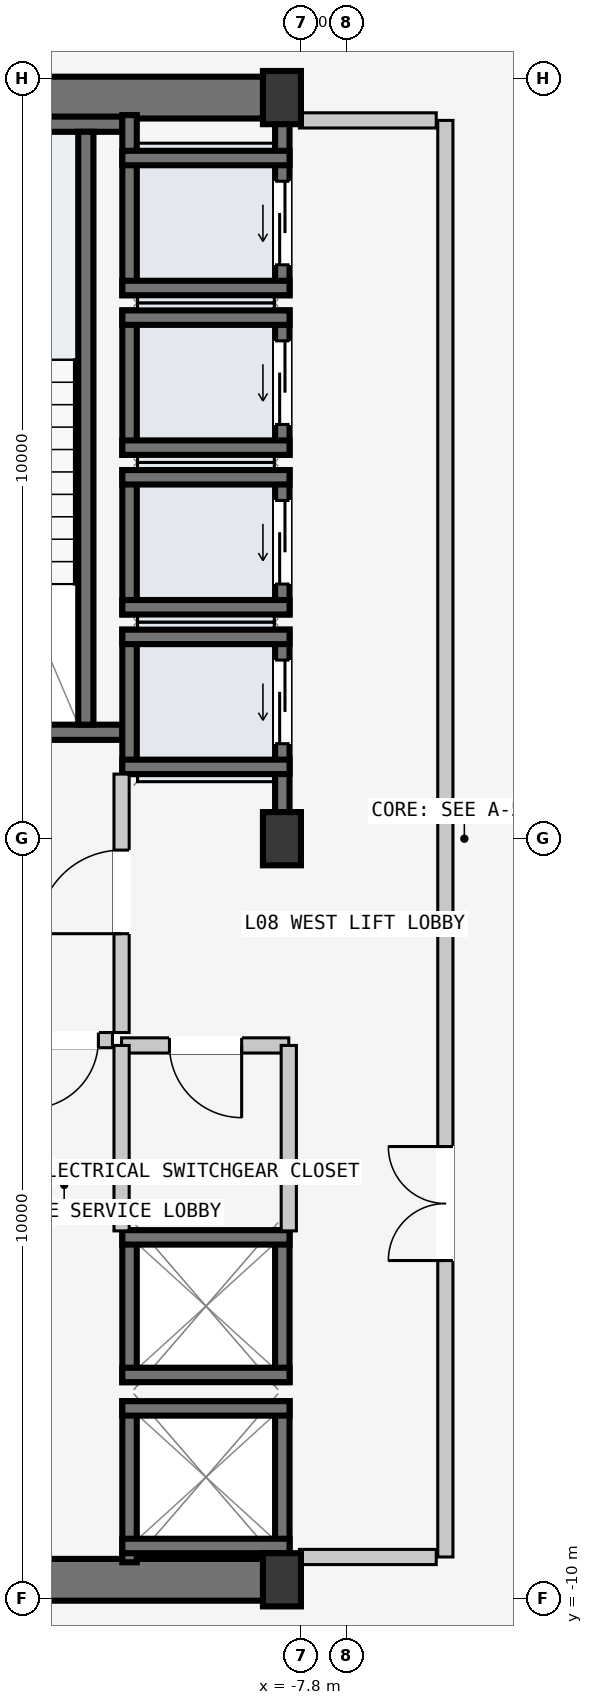
"""IFC4 building model, lengths in metres.
Left out: names, types, materials, properties, quantities, classifications, styles, units other than length and angle.
Written with IfcOpenShell. Run it as: python <this file> out.ifc"""

import sys

from ifc_helpers import new_model, si_unit, direction, frame, frame_2d, origin, origin_2d, place, context, subcontext, project, spatial, rectangle, i_section, extrude, element, fill, save


model = new_model("IFC4")
c1 = context("Model", 3, precision=1e-05, world=origin(), true_north=direction((0.0, 1.0)))
c2 = subcontext(c1, "Body", "Model", "MODEL_VIEW")
j1 = project(units=[si_unit("LENGTHUNIT", "METRE"), si_unit("PLANEANGLEUNIT", "RADIAN")], contexts=[c1])
p1 = place(None, origin())
s1 = spatial("IfcSite", under=j1, at=p1, CompositionType="ELEMENT")
p2 = place(p1, origin())
s2 = spatial("IfcBuilding", under=s1, at=p2, CompositionType="ELEMENT")
p3 = place(p2, frame((0.0, 0.0, 34.8)))
s3 = spatial("IfcBuildingStorey", under=s2, at=p3, CompositionType="ELEMENT", Elevation=34.8)
for number, where, z_axis, x_axis in (
    (1, (-14.53, -9.75, -0.2), (0.0, 0.0, 1.0), (1.0, 0.0, 0.0)),
    (2, (-14.53, 9.75, -0.2), (0.0, 0.0, 1.0), (1.0, 0.0, 0.0)),
):
    element("IfcWall", number, at=place(p3, frame(where, z_axis=z_axis, x_axis=x_axis)), inside=s3, PredefinedType="SHEAR", context=c2, shape_type="SweptSolid", body=[
        extrude(rectangle(XDim=6.46, YDim=0.55, at=frame_2d((3.23, 0.0))), origin(), (0.0, 0.0, 1.0), 3.6),
    ])
p4 = place(p3, frame((-14.25, 1.4, -0.2), z_axis=(0.0, 0.0, 1.0), x_axis=(1.0, 0.0, 0.0)))
e3 = element("IfcWall", 3, at=p4, inside=s3, PredefinedType="SOLIDWALL", context=c2, shape_type="SweptSolid", body=[
    extrude(rectangle(XDim=4.1, YDim=0.2, at=frame_2d((2.05, 0.0))), origin(), (0.0, 0.0, 1.0), 3.6),
])
p5 = place(p4, frame((1.5, 0.0, 0.2)))
e4 = element("IfcOpeningElement", 4, at=p5, cuts=e3, PredefinedType="OPENING", context=c2, shape_type="SweptSolid", body=[
    extrude(rectangle(XDim=1.12, YDim=2.18, at=frame_2d((0.56, 1.09))), frame((0.0, 0.11, 0.0), z_axis=(0.0, -1.0, 0.0), x_axis=(1.0, 0.0, 0.0)), (0.0, 0.0, 1.0), 0.22),
])
p6 = place(p3, frame((-14.25, 9.4, -0.2), z_axis=(0.0, 0.0, 1.0), x_axis=(1.0, 0.0, 0.0)))
e5 = element("IfcWall", 5, at=p6, inside=s3, PredefinedType="SOLIDWALL", context=c2, shape_type="SweptSolid", body=[
    extrude(rectangle(XDim=4.1, YDim=0.2, at=frame_2d((2.05, 0.0))), origin(), (0.0, 0.0, 1.0), 3.6),
])
p7 = place(p3, frame((-10.63, 1.5, -0.2), z_axis=(0.0, 0.0, 1.0), x_axis=(0.0, 1.0, 0.0)))
e6 = element("IfcWall", 6, at=p7, inside=s3, PredefinedType="SOLIDWALL", context=c2, shape_type="SweptSolid", body=[
    extrude(rectangle(XDim=7.8, YDim=0.2, at=frame_2d((3.9, 0.0))), origin(), (0.0, 0.0, 1.0), 3.6),
])
for number, where, z_axis, x_axis in (
    (7, (-8.05, -9.75, 0.0), (0.0, 0.0, 1.0), (1.0, 0.0, 0.0)),
    (8, (-8.05, 0.0, 0.0), (0.0, 0.0, 1.0), (1.0, 0.0, 0.0)),
    (9, (-8.05, 9.75, 0.0), (0.0, 0.0, 1.0), (1.0, 0.0, 0.0)),
):
    element("IfcColumn", number, at=place(p3, frame(where, z_axis=z_axis, x_axis=x_axis)), inside=s3, PredefinedType="COLUMN", context=c2, shape_type="SweptSolid", body=[
        extrude(i_section(OverallWidth=0.5, OverallDepth=0.7, WebThickness=0.028, FlangeThickness=0.045, at=origin_2d()), origin(), (0.0, 0.0, 1.0), 3.6),
    ])
p8 = place(p3, frame((-8.045, 0.21, -0.2), z_axis=(0.0, 0.0, 1.0), x_axis=(0.0, 1.0, 0.0)))
e10 = element("IfcWall", 10, at=p8, inside=s3, PredefinedType="SOLIDWALL", context=c2, shape_type="SweptSolid", body=[
    extrude(rectangle(XDim=2.54, YDim=0.19, at=frame_2d((1.27, 0.0))), origin(), (0.0, 0.0, 1.0), 3.6),
])
p9 = place(p8, frame((1.04, 0.0, 0.2)))
e11 = element("IfcOpeningElement", 11, at=p9, cuts=e10, PredefinedType="OPENING", context=c2, shape_type="SweptSolid", body=[
    extrude(rectangle(XDim=1.1, YDim=2.2, at=frame_2d((0.55, 1.1))), frame((0.0, 0.105, 0.0), z_axis=(0.0, -1.0, 0.0), x_axis=(1.0, 0.0, 0.0)), (0.0, 0.0, 1.0), 0.21),
])
p10 = place(p3, frame((-10.055, 0.85, -0.2), z_axis=(0.0, 0.0, 1.0), x_axis=(0.0, 1.0, 0.0)))
e12 = element("IfcWall", 12, at=p10, inside=s3, PredefinedType="SOLIDWALL", context=c2, shape_type="SweptSolid", body=[
    extrude(rectangle(XDim=1.9, YDim=0.19, at=frame_2d((0.95, 0.0))), origin(), (0.0, 0.0, 1.0), 3.6),
])
for number, where, z_axis, x_axis in (
    (13, (-10.15, 2.655, -0.2), (0.0, 0.0, 1.0), (1.0, 0.0, 0.0)),
    (14, (-10.15, 0.945, -0.2), (0.0, 0.0, 1.0), (1.0, 0.0, 0.0)),
):
    element("IfcWall", number, at=place(p3, frame(where, z_axis=z_axis, x_axis=x_axis)), inside=s3, PredefinedType="SOLIDWALL", context=c2, shape_type="SweptSolid", body=[
        extrude(rectangle(XDim=2.2, YDim=0.19, at=frame_2d((1.1, 0.0))), origin(), (0.0, 0.0, 1.0), 3.6),
    ])
p11 = place(p3, frame((-8.045, 2.95, -0.2), z_axis=(0.0, 0.0, 1.0), x_axis=(0.0, 1.0, 0.0)))
e15 = element("IfcWall", 15, at=p11, inside=s3, PredefinedType="SOLIDWALL", context=c2, shape_type="SweptSolid", body=[
    extrude(rectangle(XDim=1.9, YDim=0.19, at=frame_2d((0.95, 0.0))), origin(), (0.0, 0.0, 1.0), 3.6),
])
p12 = place(p11, frame((0.4, 0.0, 0.2)))
e16 = element("IfcOpeningElement", 16, at=p12, cuts=e15, PredefinedType="OPENING", context=c2, shape_type="SweptSolid", body=[
    extrude(rectangle(XDim=1.1, YDim=2.2, at=frame_2d((0.55, 1.1))), frame((0.0, 0.105, 0.0), z_axis=(0.0, -1.0, 0.0), x_axis=(1.0, 0.0, 0.0)), (0.0, 0.0, 1.0), 0.21),
])
p13 = place(p3, frame((-10.055, 2.95, -0.2), z_axis=(0.0, 0.0, 1.0), x_axis=(0.0, 1.0, 0.0)))
e17 = element("IfcWall", 17, at=p13, inside=s3, PredefinedType="SOLIDWALL", context=c2, shape_type="SweptSolid", body=[
    extrude(rectangle(XDim=1.9, YDim=0.19, at=frame_2d((0.95, 0.0))), origin(), (0.0, 0.0, 1.0), 3.6),
])
for number, where, z_axis, x_axis in (
    (18, (-10.15, 4.755, -0.2), (0.0, 0.0, 1.0), (1.0, 0.0, 0.0)),
    (19, (-10.15, 3.045, -0.2), (0.0, 0.0, 1.0), (1.0, 0.0, 0.0)),
):
    element("IfcWall", number, at=place(p3, frame(where, z_axis=z_axis, x_axis=x_axis)), inside=s3, PredefinedType="SOLIDWALL", context=c2, shape_type="SweptSolid", body=[
        extrude(rectangle(XDim=2.2, YDim=0.19, at=frame_2d((1.1, 0.0))), origin(), (0.0, 0.0, 1.0), 3.6),
    ])
p14 = place(p3, frame((-8.045, 5.05, -0.2), z_axis=(0.0, 0.0, 1.0), x_axis=(0.0, 1.0, 0.0)))
e20 = element("IfcWall", 20, at=p14, inside=s3, PredefinedType="SOLIDWALL", context=c2, shape_type="SweptSolid", body=[
    extrude(rectangle(XDim=1.9, YDim=0.19, at=frame_2d((0.95, 0.0))), origin(), (0.0, 0.0, 1.0), 3.6),
])
p15 = place(p14, frame((0.4, 0.0, 0.2)))
e21 = element("IfcOpeningElement", 21, at=p15, cuts=e20, PredefinedType="OPENING", context=c2, shape_type="SweptSolid", body=[
    extrude(rectangle(XDim=1.1, YDim=2.2, at=frame_2d((0.55, 1.1))), frame((0.0, 0.105, 0.0), z_axis=(0.0, -1.0, 0.0), x_axis=(1.0, 0.0, 0.0)), (0.0, 0.0, 1.0), 0.21),
])
p16 = place(p3, frame((-10.055, 5.05, -0.2), z_axis=(0.0, 0.0, 1.0), x_axis=(0.0, 1.0, 0.0)))
e22 = element("IfcWall", 22, at=p16, inside=s3, PredefinedType="SOLIDWALL", context=c2, shape_type="SweptSolid", body=[
    extrude(rectangle(XDim=1.9, YDim=0.19, at=frame_2d((0.95, 0.0))), origin(), (0.0, 0.0, 1.0), 3.6),
])
for number, where, z_axis, x_axis in (
    (23, (-10.15, 6.855, -0.2), (0.0, 0.0, 1.0), (1.0, 0.0, 0.0)),
    (24, (-10.15, 5.145, -0.2), (0.0, 0.0, 1.0), (1.0, 0.0, 0.0)),
):
    element("IfcWall", number, at=place(p3, frame(where, z_axis=z_axis, x_axis=x_axis)), inside=s3, PredefinedType="SOLIDWALL", context=c2, shape_type="SweptSolid", body=[
        extrude(rectangle(XDim=2.2, YDim=0.19, at=frame_2d((1.1, 0.0))), origin(), (0.0, 0.0, 1.0), 3.6),
    ])
p17 = place(p3, frame((-8.045, 7.15, -0.2), z_axis=(0.0, 0.0, 1.0), x_axis=(0.0, 1.0, 0.0)))
e25 = element("IfcWall", 25, at=p17, inside=s3, PredefinedType="SOLIDWALL", context=c2, shape_type="SweptSolid", body=[
    extrude(rectangle(XDim=2.37, YDim=0.19, at=frame_2d((1.185, 0.0))), origin(), (0.0, 0.0, 1.0), 3.6),
])
p18 = place(p17, frame((0.4, 0.0, 0.2)))
e26 = element("IfcOpeningElement", 26, at=p18, cuts=e25, PredefinedType="OPENING", context=c2, shape_type="SweptSolid", body=[
    extrude(rectangle(XDim=1.1, YDim=2.2, at=frame_2d((0.55, 1.1))), frame((0.0, 0.105, 0.0), z_axis=(0.0, -1.0, 0.0), x_axis=(1.0, 0.0, 0.0)), (0.0, 0.0, 1.0), 0.21),
])
p19 = place(p3, frame((-10.055, 7.15, -0.2), z_axis=(0.0, 0.0, 1.0), x_axis=(0.0, 1.0, 0.0)))
e27 = element("IfcWall", 27, at=p19, inside=s3, PredefinedType="SOLIDWALL", context=c2, shape_type="SweptSolid", body=[
    extrude(rectangle(XDim=2.37, YDim=0.19, at=frame_2d((1.185, 0.0))), origin(), (0.0, 0.0, 1.0), 3.6),
])
for number, where, z_axis, x_axis in (
    (28, (-10.15, 8.955, -0.2), (0.0, 0.0, 1.0), (1.0, 0.0, 0.0)),
    (29, (-10.15, 7.245, -0.2), (0.0, 0.0, 1.0), (1.0, 0.0, 0.0)),
):
    element("IfcWall", number, at=place(p3, frame(where, z_axis=z_axis, x_axis=x_axis)), inside=s3, PredefinedType="SOLIDWALL", context=c2, shape_type="SweptSolid", body=[
        extrude(rectangle(XDim=2.2, YDim=0.19, at=frame_2d((1.1, 0.0))), origin(), (0.0, 0.0, 1.0), 3.6),
    ])
for number, where, z_axis, x_axis in (
    (30, (-8.045, -9.52, -0.2), (0.0, 0.0, 1.0), (0.0, 1.0, 0.0)),
    (31, (-10.055, -9.52, -0.2), (0.0, 0.0, 1.0), (0.0, 1.0, 0.0)),
):
    element("IfcWall", number, at=place(p3, frame(where, z_axis=z_axis, x_axis=x_axis)), inside=s3, PredefinedType="SOLIDWALL", context=c2, shape_type="SweptSolid", body=[
        extrude(rectangle(XDim=2.12, YDim=0.19, at=frame_2d((1.06, 0.0))), origin(), (0.0, 0.0, 1.0), 3.6),
    ])
for number, where, z_axis, x_axis in (
    (32, (-10.15, -7.495, -0.2), (0.0, 0.0, 1.0), (1.0, 0.0, 0.0)),
    (33, (-10.15, -9.305, -0.2), (0.0, 0.0, 1.0), (1.0, 0.0, 0.0)),
):
    element("IfcWall", number, at=place(p3, frame(where, z_axis=z_axis, x_axis=x_axis)), inside=s3, PredefinedType="SOLIDWALL", context=c2, shape_type="SweptSolid", body=[
        extrude(rectangle(XDim=2.2, YDim=0.19, at=frame_2d((1.1, 0.0))), origin(), (0.0, 0.0, 1.0), 3.6),
    ])
for number, where, z_axis, x_axis in (
    (34, (-8.045, -7.15, -0.2), (0.0, 0.0, 1.0), (0.0, 1.0, 0.0)),
    (35, (-10.055, -7.15, -0.2), (0.0, 0.0, 1.0), (0.0, 1.0, 0.0)),
):
    element("IfcWall", number, at=place(p3, frame(where, z_axis=z_axis, x_axis=x_axis)), inside=s3, PredefinedType="SOLIDWALL", context=c2, shape_type="SweptSolid", body=[
        extrude(rectangle(XDim=2.0, YDim=0.19, at=frame_2d((1.0, 0.0))), origin(), (0.0, 0.0, 1.0), 3.6),
    ])
for number, where, z_axis, x_axis in (
    (36, (-10.15, -5.245, -0.2), (0.0, 0.0, 1.0), (1.0, 0.0, 0.0)),
    (37, (-10.15, -7.055, -0.2), (0.0, 0.0, 1.0), (1.0, 0.0, 0.0)),
):
    element("IfcWall", number, at=place(p3, frame(where, z_axis=z_axis, x_axis=x_axis)), inside=s3, PredefinedType="SOLIDWALL", context=c2, shape_type="SweptSolid", body=[
        extrude(rectangle(XDim=2.2, YDim=0.19, at=frame_2d((1.1, 0.0))), origin(), (0.0, 0.0, 1.0), 3.6),
    ])
p20 = place(p3, frame((-5.9, -9.45, 0.0), z_axis=(0.0, 0.0, 1.0), x_axis=(0.0, 1.0, 0.0)))
e38 = element("IfcWall", 38, at=p20, inside=s3, PredefinedType="PARTITIONING", context=c2, shape_type="SweptSolid", body=[
    extrude(rectangle(XDim=18.9, YDim=0.2, at=frame_2d((9.45, 0.0))), origin(), (0.0, 0.0, 1.0), 3.4),
])
p21 = place(p20, frame((3.9, 0.0, 0.0)))
e39 = element("IfcOpeningElement", 39, at=p21, cuts=e38, PredefinedType="OPENING", context=c2, shape_type="SweptSolid", body=[
    extrude(rectangle(XDim=1.5, YDim=2.2, at=frame_2d((0.75, 1.1))), frame((0.0, 0.11, 0.0), z_axis=(0.0, -1.0, 0.0), x_axis=(1.0, 0.0, 0.0)), (0.0, 0.0, 1.0), 0.22),
])
for number, where, z_axis, x_axis in (
    (40, (-6.02, -9.45, 0.0), (0.0, 0.0, 1.0), (-1.0, 0.0, 0.0)),
    (41, (-6.02, 9.45, 0.0), (0.0, 0.0, 1.0), (-1.0, 0.0, 0.0)),
):
    element("IfcWall", number, at=place(p3, frame(where, z_axis=z_axis, x_axis=x_axis)), inside=s3, PredefinedType="PARTITIONING", context=c2, shape_type="SweptSolid", body=[
        extrude(rectangle(XDim=1.8, YDim=0.2, at=frame_2d((0.9, 0.0))), origin(), (0.0, 0.0, 1.0), 3.4),
    ])
p22 = place(p3, frame((-10.16, -2.55, 0.0), z_axis=(0.0, 0.0, 1.0), x_axis=(0.0, 1.0, 0.0)))
e42 = element("IfcWall", 42, at=p22, inside=s3, PredefinedType="PARTITIONING", context=c2, shape_type="SweptSolid", body=[
    extrude(rectangle(XDim=3.4, YDim=0.2, at=frame_2d((1.7, 0.0))), origin(), (0.0, 0.0, 1.0), 3.4),
])
p23 = place(p22, frame((1.3, 0.0, 0.0)))
e43 = element("IfcOpeningElement", 43, at=p23, cuts=e42, PredefinedType="OPENING", context=c2, shape_type="SweptSolid", body=[
    extrude(rectangle(XDim=1.1, YDim=2.15, at=frame_2d((0.55, 1.075))), frame((0.0, 0.11, 0.0), z_axis=(0.0, -1.0, 0.0), x_axis=(1.0, 0.0, 0.0)), (0.0, 0.0, 1.0), 0.22),
])
p24 = place(p3, frame((-10.28, -2.65, 0.0), z_axis=(0.0, 0.0, 1.0), x_axis=(-1.0, 0.0, 0.0)))
e44 = element("IfcWall", 44, at=p24, inside=s3, PredefinedType="PARTITIONING", context=c2, shape_type="SweptSolid", body=[
    extrude(rectangle(XDim=1.27, YDim=0.2, at=frame_2d((0.635, 0.0))), origin(), (0.0, 0.0, 1.0), 3.4),
])
p25 = place(p24, frame((0.185, 0.0, 0.0)))
e45 = element("IfcOpeningElement", 45, at=p25, cuts=e44, PredefinedType="OPENING", context=c2, shape_type="SweptSolid", body=[
    extrude(rectangle(XDim=0.9, YDim=2.15, at=frame_2d((0.45, 1.075))), frame((0.0, 0.11, 0.0), z_axis=(0.0, -1.0, 0.0), x_axis=(1.0, 0.0, 0.0)), (0.0, 0.0, 1.0), 0.22),
])
p26 = place(p3, frame((-7.96, -2.72, 0.0), z_axis=(0.0, 0.0, 1.0), x_axis=(-1.0, 0.0, 0.0)))
e46 = element("IfcWall", 46, at=p26, inside=s3, PredefinedType="PARTITIONING", context=c2, shape_type="SweptSolid", body=[
    extrude(rectangle(XDim=2.2, YDim=0.2, at=frame_2d((1.1, 0.0))), origin(), (0.0, 0.0, 1.0), 3.4),
])
p27 = place(p26, frame((0.62, 0.0, 0.0)))
e47 = element("IfcOpeningElement", 47, at=p27, cuts=e46, PredefinedType="OPENING", context=c2, shape_type="SweptSolid", body=[
    extrude(rectangle(XDim=0.95, YDim=2.1, at=frame_2d((0.475, 1.05))), frame((0.0, 0.11, 0.0), z_axis=(0.0, -1.0, 0.0), x_axis=(1.0, 0.0, 0.0)), (0.0, 0.0, 1.0), 0.22),
])
for number, where, z_axis, x_axis in (
    (48, (-7.96, -5.16, 0.0), (0.0, 0.0, 1.0), (0.0, 1.0, 0.0)),
    (49, (-10.16, -5.16, 0.0), (0.0, 0.0, 1.0), (0.0, 1.0, 0.0)),
):
    element("IfcWall", number, at=place(p3, frame(where, z_axis=z_axis, x_axis=x_axis)), inside=s3, PredefinedType="PARTITIONING", context=c2, shape_type="SweptSolid", body=[
        extrude(rectangle(XDim=2.44, YDim=0.2, at=frame_2d((1.22, 0.0))), origin(), (0.0, 0.0, 1.0), 3.4),
    ])
p28 = place(p9, origin())
e50 = element("IfcDoor", 50, at=p28, inside=s3, OperationType="SLIDING_TO_LEFT", PredefinedType="DOOR", context=c2, shape_type="SweptSolid", body=[
    extrude(rectangle(XDim=1.1, YDim=2.2, at=frame_2d((0.55, 1.1))), frame((0.0, 0.025, 0.0), z_axis=(0.0, -1.0, 0.0), x_axis=(1.0, 0.0, 0.0)), (0.0, 0.0, 1.0), 0.05),
])
fill(e11, e50)
p29 = place(p12, origin())
e51 = element("IfcDoor", 51, at=p29, inside=s3, OperationType="SLIDING_TO_LEFT", PredefinedType="DOOR", context=c2, shape_type="SweptSolid", body=[
    extrude(rectangle(XDim=1.1, YDim=2.2, at=frame_2d((0.55, 1.1))), frame((0.0, 0.025, 0.0), z_axis=(0.0, -1.0, 0.0), x_axis=(1.0, 0.0, 0.0)), (0.0, 0.0, 1.0), 0.05),
])
fill(e16, e51)
p30 = place(p15, origin())
e52 = element("IfcDoor", 52, at=p30, inside=s3, OperationType="SLIDING_TO_LEFT", PredefinedType="DOOR", context=c2, shape_type="SweptSolid", body=[
    extrude(rectangle(XDim=1.1, YDim=2.2, at=frame_2d((0.55, 1.1))), frame((0.0, 0.025, 0.0), z_axis=(0.0, -1.0, 0.0), x_axis=(1.0, 0.0, 0.0)), (0.0, 0.0, 1.0), 0.05),
])
fill(e21, e52)
p31 = place(p18, origin())
e53 = element("IfcDoor", 53, at=p31, inside=s3, OperationType="SLIDING_TO_LEFT", PredefinedType="DOOR", context=c2, shape_type="SweptSolid", body=[
    extrude(rectangle(XDim=1.1, YDim=2.2, at=frame_2d((0.55, 1.1))), frame((0.0, 0.025, 0.0), z_axis=(0.0, -1.0, 0.0), x_axis=(1.0, 0.0, 0.0)), (0.0, 0.0, 1.0), 0.05),
])
fill(e26, e53)
p32 = place(p21, origin())
e54 = element("IfcDoor", 54, at=p32, inside=s3, OperationType="DOUBLE_DOOR_SINGLE_SWING", PredefinedType="DOOR", context=c2, shape_type="SweptSolid", body=[
    extrude(rectangle(XDim=1.5, YDim=2.2, at=frame_2d((0.75, 1.1))), frame((0.0, 0.025, 0.0), z_axis=(0.0, -1.0, 0.0), x_axis=(1.0, 0.0, 0.0)), (0.0, 0.0, 1.0), 0.05),
])
fill(e39, e54)
p33 = place(p23, origin())
e55 = element("IfcDoor", 55, at=p33, inside=s3, OperationType="SINGLE_SWING_LEFT", PredefinedType="DOOR", context=c2, shape_type="SweptSolid", body=[
    extrude(rectangle(XDim=1.1, YDim=2.15, at=frame_2d((0.55, 1.075))), frame((0.0, 0.025, 0.0), z_axis=(0.0, -1.0, 0.0), x_axis=(1.0, 0.0, 0.0)), (0.0, 0.0, 1.0), 0.05),
])
fill(e43, e55)
p34 = place(p25, origin())
e56 = element("IfcDoor", 56, at=p34, inside=s3, OperationType="SINGLE_SWING_RIGHT", PredefinedType="DOOR", context=c2, shape_type="SweptSolid", body=[
    extrude(rectangle(XDim=0.9, YDim=2.15, at=frame_2d((0.45, 1.075))), frame((0.0, 0.025, 0.0), z_axis=(0.0, -1.0, 0.0), x_axis=(1.0, 0.0, 0.0)), (0.0, 0.0, 1.0), 0.05),
])
fill(e45, e56)
p35 = place(p27, origin())
e57 = element("IfcDoor", 57, at=p35, inside=s3, OperationType="SINGLE_SWING_LEFT", PredefinedType="DOOR", context=c2, shape_type="SweptSolid", body=[
    extrude(rectangle(XDim=0.95, YDim=2.1, at=frame_2d((0.475, 1.05))), frame((0.0, 0.025, 0.0), z_axis=(0.0, -1.0, 0.0), x_axis=(1.0, 0.0, 0.0)), (0.0, 0.0, 1.0), 0.05),
])
fill(e47, e57)
save(model, sys.argv[1])
